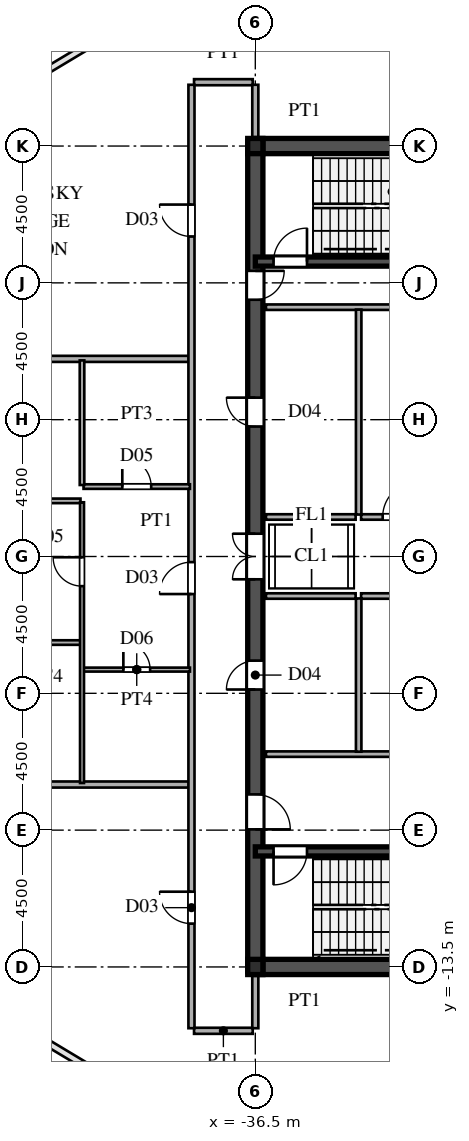
"""IFC4 building model, lengths in metres.
Left out: names, types, materials, properties, quantities, classifications, styles, units other than length and angle.
Written with IfcOpenShell. Run it as: python <this file> out.ifc"""

import sys

from ifc_helpers import new_model, si_unit, direction, frame, frame_2d, origin, origin_2d, place, context, subcontext, project, spatial, rectangle, i_section, extrude, source, transform, mapped, element, fill, save


model = new_model("IFC4")
c1 = context("Model", 3, precision=1e-05, world=origin(), true_north=direction((0.0, 1.0)))
c2 = subcontext(c1, "Body", "Model", "MODEL_VIEW")
j1 = project(units=[si_unit("LENGTHUNIT", "METRE"), si_unit("PLANEANGLEUNIT", "RADIAN")], contexts=[c1])
p1 = place(None, origin())
s1 = spatial("IfcSite", under=j1, at=p1, CompositionType="ELEMENT")
p2 = place(p1, origin())
s2 = spatial("IfcBuilding", under=s1, at=p2, CompositionType="ELEMENT")
p3 = place(p2, frame((0.0, 0.0, 229.8)))
s3 = spatial("IfcBuildingStorey", under=s2, at=p3, CompositionType="ELEMENT", Elevation=229.8)
m1 = source(origin(), c2, "Body", "SweptSolid", [
    extrude(i_section(OverallWidth=0.5, OverallDepth=0.5, WebThickness=0.02, FlangeThickness=0.032, at=origin_2d()), origin(), (0.0, 0.0, 1.0), 4.8),
])
for number, where, z_axis, x_axis in (
    (1, (-36.5, -13.5, 0.0), (0.0, 0.0, 1.0), (1.0, 0.0, 0.0)),
    (2, (-36.5, 13.5, 0.0), (0.0, 0.0, 1.0), (1.0, 0.0, 0.0)),
):
    element("IfcColumn", number, at=place(p3, frame(where, z_axis=z_axis, x_axis=x_axis)), inside=s3, PredefinedType="COLUMN", context=c2, shape_type="MappedRepresentation", body=[
        mapped(m1, transform((0.0, 0.0, 0.0), scale=1.0)),
    ])
for number, where, z_axis, x_axis in (
    (3, (-36.5, -13.5, 0.0), (0.0, 0.0, 1.0), (1.0, 0.0, 0.0)),
    (4, (-36.5, 13.5, 0.0), (0.0, 0.0, 1.0), (1.0, 0.0, 0.0)),
):
    element("IfcWall", number, at=place(p3, frame(where, z_axis=z_axis, x_axis=x_axis)), inside=s3, PredefinedType="SHEAR", context=c2, shape_type="SweptSolid", body=[
        extrude(rectangle(XDim=9.0, YDim=0.5, at=frame_2d((4.5, 0.0))), origin(), (0.0, 0.0, 1.0), 4.54),
    ])
p4 = place(p3, frame((-36.5, -13.65, 0.0), z_axis=(0.0, 0.0, 1.0), x_axis=(0.0, 1.0, 0.0)))
e5 = element("IfcWall", 5, at=p4, inside=s3, PredefinedType="SHEAR", context=c2, shape_type="SweptSolid", body=[
    extrude(rectangle(XDim=7.15, YDim=0.5, at=frame_2d((3.575, 0.0))), origin(), (0.0, 0.0, 1.0), 4.54),
])
p5 = place(p4, frame((4.675, 0.0, 0.0)))
e6 = element("IfcOpeningElement", 6, at=p5, cuts=e5, PredefinedType="OPENING", context=c2, shape_type="SweptSolid", body=[
    extrude(rectangle(XDim=1.15, YDim=2.2, at=frame_2d((0.575, 1.1))), frame((0.0, 0.26, 0.0), z_axis=(0.0, -1.0, 0.0), x_axis=(1.0, 0.0, 0.0)), (0.0, 0.0, 1.0), 0.52),
])
p6 = place(p3, frame((-36.5, -1.3, 0.0), z_axis=(0.0, 0.0, 1.0), x_axis=(0.0, 1.0, 0.0)))
e7 = element("IfcWall", 7, at=p6, inside=s3, PredefinedType="SHEAR", context=c2, shape_type="SweptSolid", body=[
    extrude(rectangle(XDim=2.6, YDim=0.5, at=frame_2d((1.3, 0.0))), origin(), (0.0, 0.0, 1.0), 4.54),
])
p7 = place(p6, frame((0.55, 0.0, 0.0)))
e8 = element("IfcOpeningElement", 8, at=p7, cuts=e7, PredefinedType="OPENING", context=c2, shape_type="SweptSolid", body=[
    extrude(rectangle(XDim=1.5, YDim=2.3, at=frame_2d((0.75, 1.15))), frame((0.0, 0.26, 0.0), z_axis=(0.0, -1.0, 0.0), x_axis=(1.0, 0.0, 0.0)), (0.0, 0.0, 1.0), 0.52),
])
p8 = place(p3, frame((-36.5, 8.2, 0.0), z_axis=(0.0, 0.0, 1.0), x_axis=(0.0, 1.0, 0.0)))
e9 = element("IfcWall", 9, at=p8, inside=s3, PredefinedType="SHEAR", context=c2, shape_type="SweptSolid", body=[
    extrude(rectangle(XDim=5.45, YDim=0.5, at=frame_2d((2.725, 0.0))), origin(), (0.0, 0.0, 1.0), 4.54),
])
p9 = place(p8, frame((0.245, 0.0, 0.0)))
e10 = element("IfcOpeningElement", 10, at=p9, cuts=e9, PredefinedType="OPENING", context=c2, shape_type="SweptSolid", body=[
    extrude(rectangle(XDim=0.95, YDim=2.15, at=frame_2d((0.475, 1.075))), frame((0.0, 0.26, 0.0), z_axis=(0.0, -1.0, 0.0), x_axis=(1.0, 0.0, 0.0)), (0.0, 0.0, 1.0), 0.52),
])
p10 = place(p3, frame((-36.5, -6.5, 0.0), z_axis=(0.0, 0.0, 1.0), x_axis=(0.0, 1.0, 0.0)))
e11 = element("IfcWall", 11, at=p10, inside=s3, PredefinedType="SHEAR", context=c2, shape_type="SweptSolid", body=[
    extrude(rectangle(XDim=5.2, YDim=0.5, at=frame_2d((2.6, 0.0))), origin(), (0.0, 0.0, 1.0), 4.54),
])
p11 = place(p10, frame((2.125, 0.0, 0.0)))
e12 = element("IfcOpeningElement", 12, at=p11, cuts=e11, PredefinedType="OPENING", context=c2, shape_type="SweptSolid", body=[
    extrude(rectangle(XDim=0.95, YDim=2.15, at=frame_2d((0.475, 1.075))), frame((0.0, 0.26, 0.0), z_axis=(0.0, -1.0, 0.0), x_axis=(1.0, 0.0, 0.0)), (0.0, 0.0, 1.0), 0.52),
])
p12 = place(p3, frame((-36.5, 1.3, 0.0), z_axis=(0.0, 0.0, 1.0), x_axis=(0.0, 1.0, 0.0)))
e13 = element("IfcWall", 13, at=p12, inside=s3, PredefinedType="SHEAR", context=c2, shape_type="SweptSolid", body=[
    extrude(rectangle(XDim=6.9, YDim=0.5, at=frame_2d((3.45, 0.0))), origin(), (0.0, 0.0, 1.0), 4.54),
])
p13 = place(p12, frame((2.975, 0.0, 0.0)))
e14 = element("IfcOpeningElement", 14, at=p13, cuts=e13, PredefinedType="OPENING", context=c2, shape_type="SweptSolid", body=[
    extrude(rectangle(XDim=0.95, YDim=2.15, at=frame_2d((0.475, 1.075))), frame((0.0, 0.26, 0.0), z_axis=(0.0, -1.0, 0.0), x_axis=(1.0, 0.0, 0.0)), (0.0, 0.0, 1.0), 0.52),
])
p14 = place(p3, frame((-36.5, -9.7, 0.0), z_axis=(0.0, 0.0, 1.0), x_axis=(1.0, 0.0, 0.0)))
e15 = element("IfcWall", 15, at=p14, inside=s3, PredefinedType="SHEAR", context=c2, shape_type="SweptSolid", body=[
    extrude(rectangle(XDim=9.0, YDim=0.3, at=frame_2d((4.5, 0.0))), origin(), (0.0, 0.0, 1.0), 4.54),
])
p15 = place(p14, frame((0.6, 0.0, 0.0)))
e16 = element("IfcOpeningElement", 16, at=p15, cuts=e15, PredefinedType="OPENING", context=c2, shape_type="SweptSolid", body=[
    extrude(rectangle(XDim=1.1, YDim=2.2, at=frame_2d((0.55, 1.1))), frame((0.0, 0.16, 0.0), z_axis=(0.0, -1.0, 0.0), x_axis=(1.0, 0.0, 0.0)), (0.0, 0.0, 1.0), 0.32),
])
p16 = place(p3, frame((-36.5, 9.7, 0.0), z_axis=(0.0, 0.0, 1.0), x_axis=(1.0, 0.0, 0.0)))
e17 = element("IfcWall", 17, at=p16, inside=s3, PredefinedType="SHEAR", context=c2, shape_type="SweptSolid", body=[
    extrude(rectangle(XDim=9.0, YDim=0.3, at=frame_2d((4.5, 0.0))), origin(), (0.0, 0.0, 1.0), 4.54),
])
p17 = place(p16, frame((0.6, 0.0, 0.0)))
e18 = element("IfcOpeningElement", 18, at=p17, cuts=e17, PredefinedType="OPENING", context=c2, shape_type="SweptSolid", body=[
    extrude(rectangle(XDim=1.1, YDim=2.2, at=frame_2d((0.55, 1.1))), frame((0.0, 0.16, 0.0), z_axis=(0.0, -1.0, 0.0), x_axis=(1.0, 0.0, 0.0)), (0.0, 0.0, 1.0), 0.32),
])
for number, where, z_axis, x_axis in (
    (19, (-36.15, -6.5, 0.0), (0.0, 0.0, 1.0), (1.0, 0.0, 0.0)),
    (20, (-36.15, 8.2, 0.0), (0.0, 0.0, 1.0), (1.0, 0.0, 0.0)),
):
    element("IfcWall", number, at=place(p3, frame(where, z_axis=z_axis, x_axis=x_axis)), inside=s3, PredefinedType="PARTITIONING", context=c2, shape_type="SweptSolid", body=[
        extrude(rectangle(XDim=5.7, YDim=0.18, at=frame_2d((2.85, 0.0))), origin(), (0.0, 0.0, 1.0), 4.54),
    ])
p18 = place(p3, frame((-33.1, -6.42, 0.0), z_axis=(0.0, 0.0, 1.0), x_axis=(0.0, 1.0, 0.0)))
e21 = element("IfcWall", 21, at=p18, inside=s3, PredefinedType="PARTITIONING", context=c2, shape_type="SweptSolid", body=[
    extrude(rectangle(XDim=5.04, YDim=0.18, at=frame_2d((2.52, 0.0))), origin(), (0.0, 0.0, 1.0), 4.54),
])
p19 = place(p3, frame((-33.1, 1.38, 0.0), z_axis=(0.0, 0.0, 1.0), x_axis=(0.0, 1.0, 0.0)))
e22 = element("IfcWall", 22, at=p19, inside=s3, PredefinedType="PARTITIONING", context=c2, shape_type="SweptSolid", body=[
    extrude(rectangle(XDim=6.74, YDim=0.18, at=frame_2d((3.37, 0.0))), origin(), (0.0, 0.0, 1.0), 4.54),
])
p20 = place(p3, frame((-33.02, -1.3, 0.0), z_axis=(0.0, 0.0, 1.0), x_axis=(1.0, 0.0, 0.0)))
e23 = element("IfcWall", 23, at=p20, inside=s3, PredefinedType="PARTITIONING", context=c2, shape_type="SweptSolid", body=[
    extrude(rectangle(XDim=5.17, YDim=0.18, at=frame_2d((2.585, 0.0))), origin(), (0.0, 0.0, 1.0), 4.54),
])
p21 = place(p20, frame((2.01, 0.0, 0.0)))
e24 = element("IfcOpeningElement", 24, at=p21, cuts=e23, PredefinedType="OPENING", context=c2, shape_type="SweptSolid", body=[
    extrude(rectangle(XDim=1.15, YDim=2.2, at=frame_2d((0.575, 1.1))), frame((0.0, 0.1, 0.0), z_axis=(0.0, -1.0, 0.0), x_axis=(1.0, 0.0, 0.0)), (0.0, 0.0, 1.0), 0.2),
])
p22 = place(p3, frame((-33.02, 1.3, 0.0), z_axis=(0.0, 0.0, 1.0), x_axis=(1.0, 0.0, 0.0)))
e25 = element("IfcWall", 25, at=p22, inside=s3, PredefinedType="PARTITIONING", context=c2, shape_type="SweptSolid", body=[
    extrude(rectangle(XDim=2.57, YDim=0.18, at=frame_2d((1.285, 0.0))), origin(), (0.0, 0.0, 1.0), 4.54),
])
p23 = place(p22, frame((0.71, 0.0, 0.0)))
e26 = element("IfcOpeningElement", 26, at=p23, cuts=e25, PredefinedType="OPENING", context=c2, shape_type="SweptSolid", body=[
    extrude(rectangle(XDim=1.15, YDim=2.2, at=frame_2d((0.575, 1.1))), frame((0.0, 0.1, 0.0), z_axis=(0.0, -1.0, 0.0), x_axis=(1.0, 0.0, 0.0)), (0.0, 0.0, 1.0), 0.2),
])
for number, where, z_axis, x_axis in (
    (27, (-36.15, -1.3, 0.0), (0.0, 0.0, 1.0), (1.0, 0.0, 0.0)),
    (28, (-36.15, 1.3, 0.0), (0.0, 0.0, 1.0), (1.0, 0.0, 0.0)),
):
    element("IfcWall", number, at=place(p3, frame(where, z_axis=z_axis, x_axis=x_axis)), inside=s3, PredefinedType="PARTITIONING", context=c2, shape_type="SweptSolid", body=[
        extrude(rectangle(XDim=2.95, YDim=0.18, at=frame_2d((1.475, 0.0))), origin(), (0.0, 0.0, 1.0), 4.54),
    ])
p24 = place(p3, frame((-38.515, -15.6, 0.0), z_axis=(0.0, 0.0, 1.0), x_axis=(1.0, 0.0, 0.0)))
e29 = element("IfcWall", 29, at=p24, inside=s3, PredefinedType="PARTITIONING", context=c2, shape_type="SweptSolid", body=[
    extrude(rectangle(XDim=1.93, YDim=0.2, at=frame_2d((0.965, 0.0))), origin(), (0.0, 0.0, 1.0), 4.54),
])
p25 = place(p3, frame((-57.51, -7.5, 0.0), z_axis=(0.0, 0.0, 1.0), x_axis=(1.0, 0.0, 0.0)))
e30 = element("IfcWall", 30, at=p25, inside=s3, PredefinedType="PARTITIONING", context=c2, shape_type="SweptSolid", body=[
    extrude(rectangle(XDim=18.83, YDim=0.2, at=frame_2d((9.415, 0.0))), origin(), (0.0, 0.0, 1.0), 4.54),
])
p26 = place(p3, frame((-42.15, -3.72, 0.0), z_axis=(0.0, 0.0, 1.0), x_axis=(1.0, 0.0, 0.0)))
e31 = element("IfcWall", 31, at=p26, inside=s3, PredefinedType="PARTITIONING", context=c2, shape_type="SweptSolid", body=[
    extrude(rectangle(XDim=3.5, YDim=0.13, at=frame_2d((1.75, 0.0))), origin(), (0.0, 0.0, 1.0), 4.54),
])
p27 = place(p26, frame((1.31, 0.0, 0.0)))
e32 = element("IfcOpeningElement", 32, at=p27, cuts=e31, PredefinedType="OPENING", context=c2, shape_type="SweptSolid", body=[
    extrude(rectangle(XDim=0.88, YDim=2.1, at=frame_2d((0.44, 1.05))), frame((0.0, 0.075, 0.0), z_axis=(0.0, -1.0, 0.0), x_axis=(1.0, 0.0, 0.0)), (0.0, 0.0, 1.0), 0.15),
])
p28 = place(p3, frame((-65.313, -2.83, 0.0), z_axis=(0.0, 0.0, 1.0), x_axis=(1.0, 0.0, 0.0)))
e33 = element("IfcWall", 33, at=p28, inside=s3, PredefinedType="PARTITIONING", context=c2, shape_type="SweptSolid", body=[
    extrude(rectangle(XDim=23.063, YDim=0.15, at=frame_2d((11.531, 0.0))), origin(), (0.0, 0.0, 1.0), 4.54),
])
p29 = place(p28, frame((19.563, 0.0, 0.0)))
e34 = element("IfcOpeningElement", 34, at=p29, cuts=e33, PredefinedType="OPENING", context=c2, shape_type="SweptSolid", body=[
    extrude(rectangle(XDim=0.95, YDim=2.15, at=frame_2d((0.475, 1.075))), frame((0.0, 0.085, 0.0), z_axis=(0.0, -1.0, 0.0), x_axis=(1.0, 0.0, 0.0)), (0.0, 0.0, 1.0), 0.17),
])
p30 = place(p28, frame((7.488, 0.0, 0.0)))
e35 = element("IfcOpeningElement", 35, at=p30, cuts=e33, PredefinedType="OPENING", context=c2, shape_type="SweptSolid", body=[
    extrude(rectangle(XDim=0.95, YDim=2.15, at=frame_2d((0.475, 1.075))), frame((0.0, 0.085, 0.0), z_axis=(0.0, -1.0, 0.0), x_axis=(1.0, 0.0, 0.0)), (0.0, 0.0, 1.0), 0.17),
])
p31 = place(p3, frame((-66.707, 1.83, 0.0), z_axis=(0.0, 0.0, 1.0), x_axis=(1.0, 0.0, 0.0)))
e36 = element("IfcWall", 36, at=p31, inside=s3, PredefinedType="PARTITIONING", context=c2, shape_type="SweptSolid", body=[
    extrude(rectangle(XDim=24.457, YDim=0.15, at=frame_2d((12.229, 0.0))), origin(), (0.0, 0.0, 1.0), 4.54),
])
p32 = place(p31, frame((20.957, 0.0, 0.0)))
e37 = element("IfcOpeningElement", 37, at=p32, cuts=e36, PredefinedType="OPENING", context=c2, shape_type="SweptSolid", body=[
    extrude(rectangle(XDim=0.95, YDim=2.15, at=frame_2d((0.475, 1.075))), frame((0.0, 0.085, 0.0), z_axis=(0.0, -1.0, 0.0), x_axis=(1.0, 0.0, 0.0)), (0.0, 0.0, 1.0), 0.17),
])
p33 = place(p31, frame((2.66, 0.0, 0.0)))
e38 = element("IfcOpeningElement", 38, at=p33, cuts=e36, PredefinedType="OPENING", context=c2, shape_type="SweptSolid", body=[
    extrude(rectangle(XDim=0.95, YDim=2.15, at=frame_2d((0.475, 1.075))), frame((0.0, 0.085, 0.0), z_axis=(0.0, -1.0, 0.0), x_axis=(1.0, 0.0, 0.0)), (0.0, 0.0, 1.0), 0.17),
])
p34 = place(p31, frame((14.807, 0.0, 0.0)))
e39 = element("IfcOpeningElement", 39, at=p34, cuts=e36, PredefinedType="OPENING", context=c2, shape_type="SweptSolid", body=[
    extrude(rectangle(XDim=0.95, YDim=2.15, at=frame_2d((0.475, 1.075))), frame((0.0, 0.085, 0.0), z_axis=(0.0, -1.0, 0.0), x_axis=(1.0, 0.0, 0.0)), (0.0, 0.0, 1.0), 0.17),
])
p35 = place(p3, frame((-42.15, 2.3, 0.0), z_axis=(0.0, 0.0, 1.0), x_axis=(1.0, 0.0, 0.0)))
e40 = element("IfcWall", 40, at=p35, inside=s3, PredefinedType="PARTITIONING", context=c2, shape_type="SweptSolid", body=[
    extrude(rectangle(XDim=3.5, YDim=0.15, at=frame_2d((1.75, 0.0))), origin(), (0.0, 0.0, 1.0), 4.54),
])
p36 = place(p35, frame((1.275, 0.0, 0.0)))
e41 = element("IfcOpeningElement", 41, at=p36, cuts=e40, PredefinedType="OPENING", context=c2, shape_type="SweptSolid", body=[
    extrude(rectangle(XDim=0.95, YDim=2.15, at=frame_2d((0.475, 1.075))), frame((0.0, 0.085, 0.0), z_axis=(0.0, -1.0, 0.0), x_axis=(1.0, 0.0, 0.0)), (0.0, 0.0, 1.0), 0.17),
])
p37 = place(p3, frame((-59.176, 6.5, 0.0), z_axis=(0.0, 0.0, 1.0), x_axis=(1.0, 0.0, 0.0)))
e42 = element("IfcWall", 42, at=p37, inside=s3, PredefinedType="PARTITIONING", context=c2, shape_type="SweptSolid", body=[
    extrude(rectangle(XDim=20.496, YDim=0.2, at=frame_2d((10.248, 0.0))), origin(), (0.0, 0.0, 1.0), 4.54),
])
p38 = place(p3, frame((-38.515, 15.6, 0.0), z_axis=(0.0, 0.0, 1.0), x_axis=(1.0, 0.0, 0.0)))
e43 = element("IfcWall", 43, at=p38, inside=s3, PredefinedType="PARTITIONING", context=c2, shape_type="SweptSolid", body=[
    extrude(rectangle(XDim=1.93, YDim=0.2, at=frame_2d((0.965, 0.0))), origin(), (0.0, 0.0, 1.0), 4.54),
])
p39 = place(p3, frame((-42.2, -7.45, 0.0), z_axis=(0.0, 0.0, 1.0), x_axis=(0.0, 1.0, 0.0)))
e44 = element("IfcWall", 44, at=p39, inside=s3, PredefinedType="PARTITIONING", context=c2, shape_type="SweptSolid", body=[
    extrude(rectangle(XDim=9.233, YDim=0.13, at=frame_2d((4.616, 0.0))), origin(), (0.0, 0.0, 1.0), 4.54),
])
p40 = place(p39, frame((6.475, 0.0, 0.0)))
e45 = element("IfcOpeningElement", 45, at=p40, cuts=e44, PredefinedType="OPENING", context=c2, shape_type="SweptSolid", body=[
    extrude(rectangle(XDim=0.95, YDim=2.15, at=frame_2d((0.475, 1.075))), frame((0.0, 0.075, 0.0), z_axis=(0.0, -1.0, 0.0), x_axis=(1.0, 0.0, 0.0)), (0.0, 0.0, 1.0), 0.15),
])
p41 = place(p3, frame((-42.2, 2.352, 0.0), z_axis=(0.0, 0.0, 1.0), x_axis=(0.0, 1.0, 0.0)))
e46 = element("IfcWall", 46, at=p41, inside=s3, PredefinedType="PARTITIONING", context=c2, shape_type="SweptSolid", body=[
    extrude(rectangle(XDim=4.098, YDim=0.15, at=frame_2d((2.049, 0.0))), origin(), (0.0, 0.0, 1.0), 4.54),
])
p42 = place(p3, frame((-38.6, -15.515, 0.0), z_axis=(0.0, 0.0, 1.0), x_axis=(0.0, 1.0, 0.0)))
e47 = element("IfcWall", 47, at=p42, inside=s3, PredefinedType="PARTITIONING", context=c2, shape_type="SweptSolid", body=[
    extrude(rectangle(XDim=31.03, YDim=0.2, at=frame_2d((15.515, 0.0))), origin(), (0.0, 0.0, 1.0), 4.54),
])
p43 = place(p42, frame((3.44, 0.0, 0.0)))
e48 = element("IfcOpeningElement", 48, at=p43, cuts=e47, PredefinedType="OPENING", context=c2, shape_type="SweptSolid", body=[
    extrude(rectangle(XDim=1.05, YDim=2.25, at=frame_2d((0.525, 1.125))), frame((0.0, 0.11, 0.0), z_axis=(0.0, -1.0, 0.0), x_axis=(1.0, 0.0, 0.0)), (0.0, 0.0, 1.0), 0.22),
])
p44 = place(p42, frame((14.28, 0.0, 0.0)))
e49 = element("IfcOpeningElement", 49, at=p44, cuts=e47, PredefinedType="OPENING", context=c2, shape_type="SweptSolid", body=[
    extrude(rectangle(XDim=1.05, YDim=2.25, at=frame_2d((0.525, 1.125))), frame((0.0, 0.11, 0.0), z_axis=(0.0, -1.0, 0.0), x_axis=(1.0, 0.0, 0.0)), (0.0, 0.0, 1.0), 0.22),
])
p45 = place(p42, frame((26.04, 0.0, 0.0)))
e50 = element("IfcOpeningElement", 50, at=p45, cuts=e47, PredefinedType="OPENING", context=c2, shape_type="SweptSolid", body=[
    extrude(rectangle(XDim=1.05, YDim=2.25, at=frame_2d((0.525, 1.125))), frame((0.0, 0.11, 0.0), z_axis=(0.0, -1.0, 0.0), x_axis=(1.0, 0.0, 0.0)), (0.0, 0.0, 1.0), 0.22),
])
for number, where, z_axis, x_axis in (
    (51, (-36.5, -15.515, 0.0), (0.0, 0.0, 1.0), (0.0, 1.0, 0.0)),
    (52, (-36.5, 13.755, 0.0), (0.0, 0.0, 1.0), (0.0, 1.0, 0.0)),
):
    element("IfcWall", number, at=place(p3, frame(where, z_axis=z_axis, x_axis=x_axis)), inside=s3, PredefinedType="PARTITIONING", context=c2, shape_type="SweptSolid", body=[
        extrude(rectangle(XDim=1.76, YDim=0.2, at=frame_2d((0.88, 0.0))), origin(), (0.0, 0.0, 1.0), 3.94),
    ])
m2 = source(origin(), c2, "Body", "SweptSolid", [
    extrude(rectangle(XDim=1.15, YDim=2.2, at=frame_2d((0.575, 1.1))), frame((0.0, 0.025, 0.0), z_axis=(0.0, -1.0, 0.0), x_axis=(1.0, 0.0, 0.0)), (0.0, 0.0, 1.0), 0.05),
])
p46 = place(p5, frame((1.15, 0.0, 0.0), z_axis=(0.0, 0.0, 1.0), x_axis=(-1.0, 0.0, 0.0)))
e53 = element("IfcDoor", 53, at=p46, inside=s3, OperationType="SINGLE_SWING_LEFT", PredefinedType="DOOR", context=c2, shape_type="MappedRepresentation", body=[
    mapped(m2, transform((0.0, 0.0, 0.0), scale=1.0)),
])
fill(e6, e53)
m3 = source(origin(), c2, "Body", "SweptSolid", [
    extrude(rectangle(XDim=1.5, YDim=2.3, at=frame_2d((0.75, 1.15))), frame((0.0, 0.025, 0.0), z_axis=(0.0, -1.0, 0.0), x_axis=(1.0, 0.0, 0.0)), (0.0, 0.0, 1.0), 0.05),
])
p47 = place(p7, origin())
e54 = element("IfcDoor", 54, at=p47, inside=s3, OperationType="DOUBLE_SWING_LEFT", PredefinedType="DOOR", context=c2, shape_type="MappedRepresentation", body=[
    mapped(m3, transform((0.0, 0.0, 0.0), scale=1.0)),
])
fill(e8, e54)
m4 = source(origin(), c2, "Body", "SweptSolid", [
    extrude(rectangle(XDim=0.95, YDim=2.15, at=frame_2d((0.475, 1.075))), frame((0.0, 0.025, 0.0), z_axis=(0.0, -1.0, 0.0), x_axis=(1.0, 0.0, 0.0)), (0.0, 0.0, 1.0), 0.05),
])
p48 = place(p9, frame((0.95, 0.0, 0.0), z_axis=(0.0, 0.0, 1.0), x_axis=(-1.0, 0.0, 0.0)))
e55 = element("IfcDoor", 55, at=p48, inside=s3, OperationType="SINGLE_SWING_RIGHT", PredefinedType="DOOR", context=c2, shape_type="MappedRepresentation", body=[
    mapped(m4, transform((0.0, 0.0, 0.0), scale=1.0)),
])
fill(e10, e55)
p49 = place(p11, origin())
e56 = element("IfcDoor", 56, at=p49, inside=s3, OperationType="SINGLE_SWING_LEFT", PredefinedType="DOOR", context=c2, shape_type="MappedRepresentation", body=[
    mapped(m4, transform((0.0, 0.0, 0.0), scale=1.0)),
])
fill(e12, e56)
p50 = place(p13, origin())
e57 = element("IfcDoor", 57, at=p50, inside=s3, OperationType="SINGLE_SWING_RIGHT", PredefinedType="DOOR", context=c2, shape_type="MappedRepresentation", body=[
    mapped(m4, transform((0.0, 0.0, 0.0), scale=1.0)),
])
fill(e14, e57)
m5 = source(origin(), c2, "Body", "SweptSolid", [
    extrude(rectangle(XDim=1.1, YDim=2.2, at=frame_2d((0.55, 1.1))), frame((0.0, 0.025, 0.0), z_axis=(0.0, -1.0, 0.0), x_axis=(1.0, 0.0, 0.0)), (0.0, 0.0, 1.0), 0.05),
])
p51 = place(p15, frame((1.1, 0.0, 0.0), z_axis=(0.0, 0.0, 1.0), x_axis=(-1.0, 0.0, 0.0)))
e58 = element("IfcDoor", 58, at=p51, inside=s3, OperationType="SINGLE_SWING_LEFT", PredefinedType="DOOR", context=c2, shape_type="MappedRepresentation", body=[
    mapped(m5, transform((0.0, 0.0, 0.0), scale=1.0)),
])
fill(e16, e58)
p52 = place(p17, origin())
e59 = element("IfcDoor", 59, at=p52, inside=s3, OperationType="SINGLE_SWING_RIGHT", PredefinedType="DOOR", context=c2, shape_type="MappedRepresentation", body=[
    mapped(m5, transform((0.0, 0.0, 0.0), scale=1.0)),
])
fill(e18, e59)
p53 = place(p23, origin())
e60 = element("IfcDoor", 60, at=p53, inside=s3, OperationType="SINGLE_SWING_RIGHT", PredefinedType="DOOR", context=c2, shape_type="MappedRepresentation", body=[
    mapped(m2, transform((0.0, 0.0, 0.0), scale=1.0)),
])
fill(e26, e60)
m6 = source(origin(), c2, "Body", "SweptSolid", [
    extrude(rectangle(XDim=0.88, YDim=2.1, at=frame_2d((0.44, 1.05))), frame((0.0, 0.025, 0.0), z_axis=(0.0, -1.0, 0.0), x_axis=(1.0, 0.0, 0.0)), (0.0, 0.0, 1.0), 0.05),
])
p54 = place(p27, origin())
e61 = element("IfcDoor", 61, at=p54, inside=s3, OperationType="SINGLE_SWING_LEFT", PredefinedType="DOOR", context=c2, shape_type="MappedRepresentation", body=[
    mapped(m6, transform((0.0, 0.0, 0.0), scale=1.0)),
])
fill(e32, e61)
m7 = source(origin(), c2, "Body", "SweptSolid", [
    extrude(rectangle(XDim=0.95, YDim=2.15, at=frame_2d((0.475, 1.075))), frame((0.0, 0.025, 0.0), z_axis=(0.0, -1.0, 0.0), x_axis=(1.0, 0.0, 0.0)), (0.0, 0.0, 1.0), 0.05),
])
p55 = place(p36, origin())
e62 = element("IfcDoor", 62, at=p55, inside=s3, OperationType="SINGLE_SWING_LEFT", PredefinedType="DOOR", context=c2, shape_type="MappedRepresentation", body=[
    mapped(m7, transform((0.0, 0.0, 0.0), scale=1.0)),
])
fill(e41, e62)
p56 = place(p40, origin())
e63 = element("IfcDoor", 63, at=p56, inside=s3, OperationType="SINGLE_SWING_RIGHT", PredefinedType="DOOR", context=c2, shape_type="MappedRepresentation", body=[
    mapped(m7, transform((0.0, 0.0, 0.0), scale=1.0)),
])
fill(e45, e63)
m8 = source(origin(), c2, "Body", "SweptSolid", [
    extrude(rectangle(XDim=1.05, YDim=2.25, at=frame_2d((0.525, 1.125))), frame((0.0, 0.025, 0.0), z_axis=(0.0, -1.0, 0.0), x_axis=(1.0, 0.0, 0.0)), (0.0, 0.0, 1.0), 0.05),
])
p57 = place(p43, origin())
e64 = element("IfcDoor", 64, at=p57, inside=s3, OperationType="SINGLE_SWING_RIGHT", PredefinedType="DOOR", context=c2, shape_type="MappedRepresentation", body=[
    mapped(m8, transform((0.0, 0.0, 0.0), scale=1.0)),
])
fill(e48, e64)
p58 = place(p44, origin())
e65 = element("IfcDoor", 65, at=p58, inside=s3, OperationType="SINGLE_SWING_LEFT", PredefinedType="DOOR", context=c2, shape_type="MappedRepresentation", body=[
    mapped(m8, transform((0.0, 0.0, 0.0), scale=1.0)),
])
fill(e49, e65)
p59 = place(p45, origin())
e66 = element("IfcDoor", 66, at=p59, inside=s3, OperationType="SINGLE_SWING_RIGHT", PredefinedType="DOOR", context=c2, shape_type="MappedRepresentation", body=[
    mapped(m8, transform((0.0, 0.0, 0.0), scale=1.0)),
])
fill(e50, e66)
save(model, sys.argv[1])
